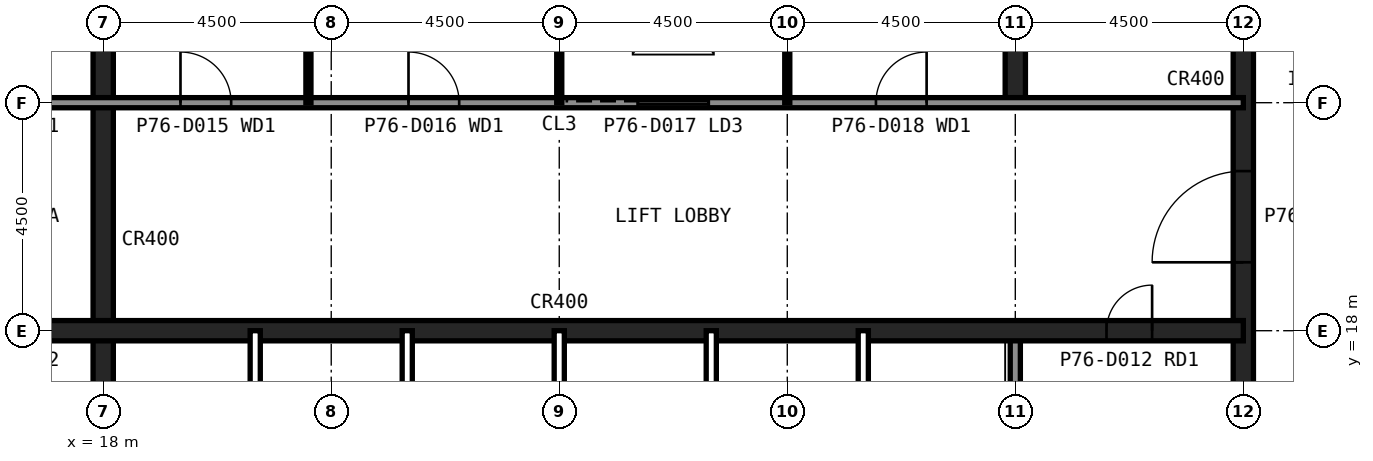
"""IFC4 building model, lengths in metres.
Left out: names, types, materials, properties, quantities, classifications, styles, units other than length and angle.
Written with IfcOpenShell. Run it as: python <this file> out.ifc"""

import sys

from ifc_helpers import new_model, si_unit, direction, frame, frame_2d, origin, place, context, subcontext, project, spatial, polyline, rectangle, outline, extrude, element, fill, save


model = new_model("IFC4")
c1 = context("Model", 3, precision=1e-05, world=origin(), true_north=direction((0.0, 1.0)))
c2 = subcontext(c1, "Body", "Model", "MODEL_VIEW")
j1 = project(units=[si_unit("LENGTHUNIT", "METRE"), si_unit("PLANEANGLEUNIT", "RADIAN")], contexts=[c1])
p1 = place(None, origin())
s1 = spatial("IfcSite", under=j1, at=p1, CompositionType="ELEMENT")
p2 = place(p1, origin())
s2 = spatial("IfcBuilding", under=s1, at=p2, CompositionType="ELEMENT")
p3 = place(p2, frame((0.0, 0.0, 320.1)))
s3 = spatial("IfcBuildingStorey", under=s2, at=p3, CompositionType="ELEMENT", Elevation=320.1)
p4 = place(p3, frame((40.5, 13.5, 0.0), z_axis=(0.0, 0.0, 1.0), x_axis=(0.0, 1.0, 0.0)))
e1 = element("IfcWall", 1, at=p4, inside=s3, PredefinedType="SHEAR", context=c2, shape_type="SweptSolid", body=[
    extrude(outline(polyline([(0.0, 0.0), (27.0, 0.0), (27.0, 17.377), (0.0, 9.277), (0.0, 0.0)])), frame((0.0, 0.2, 0.0), z_axis=(0.0, -1.0, 0.0), x_axis=(1.0, 0.0, 0.0)), (0.0, 0.0, 1.0), 0.4),
])
p5 = place(p4, frame((5.85, 0.0, 0.0)))
e2 = element("IfcOpeningElement", 2, at=p5, cuts=e1, PredefinedType="OPENING", context=c2, shape_type="SweptSolid", body=[
    extrude(rectangle(XDim=1.8, YDim=2.1, at=frame_2d((0.9, 1.05))), frame((0.0, 0.21, 0.0), z_axis=(0.0, -1.0, 0.0), x_axis=(1.0, 0.0, 0.0)), (0.0, 0.0, 1.0), 0.42),
])
p6 = place(p4, frame((19.65, 0.0, 0.0)))
e3 = element("IfcOpeningElement", 3, at=p6, cuts=e1, PredefinedType="OPENING", context=c2, shape_type="SweptSolid", body=[
    extrude(rectangle(XDim=1.2, YDim=2.1, at=frame_2d((0.6, 1.05))), frame((0.0, 0.21, 0.0), z_axis=(0.0, -1.0, 0.0), x_axis=(1.0, 0.0, 0.0)), (0.0, 0.0, 1.0), 0.42),
])
p7 = place(p3, frame((18.0, 13.5, 0.0), z_axis=(0.0, 0.0, 1.0), x_axis=(0.0, 1.0, 0.0)))
e4 = element("IfcWall", 4, at=p7, inside=s3, PredefinedType="SHEAR", context=c2, shape_type="SweptSolid", body=[
    extrude(outline(polyline([(0.0, 0.0), (18.0, 0.0), (18.0, 14.677), (0.0, 9.277), (0.0, 0.0)])), frame((0.0, 0.2, 0.0), z_axis=(0.0, -1.0, 0.0), x_axis=(1.0, 0.0, 0.0)), (0.0, 0.0, 1.0), 0.4),
])
p8 = place(p3, frame((36.0, 13.5, 0.0), z_axis=(0.0, 0.0, 1.0), x_axis=(0.0, 1.0, 0.0)))
e5 = element("IfcWall", 5, at=p8, inside=s3, PredefinedType="SOLIDWALL", context=c2, shape_type="SweptSolid", body=[
    extrude(outline(polyline([(0.0, 0.0), (4.5, 0.0), (4.5, 10.477), (0.0, 9.127), (0.0, 0.0)])), frame((0.0, 0.1, 0.0), z_axis=(0.0, -1.0, 0.0), x_axis=(1.0, 0.0, 0.0)), (0.0, 0.0, 1.0), 0.2),
])
p9 = place(p3, frame((36.0, 22.5, 0.0), z_axis=(0.0, 0.0, 1.0), x_axis=(0.0, 1.0, 0.0)))
e6 = element("IfcWall", 6, at=p9, inside=s3, PredefinedType="SHEAR", context=c2, shape_type="SweptSolid", body=[
    extrude(outline(polyline([(0.0, 0.0), (18.0, 0.0), (18.0, 17.377), (0.0, 11.977), (0.0, 0.0)])), frame((0.0, 0.2, 0.0), z_axis=(0.0, -1.0, 0.0), x_axis=(1.0, 0.0, 0.0)), (0.0, 0.0, 1.0), 0.4),
])
p10 = place(p3, frame((13.5, 18.0, 0.0), z_axis=(0.0, 0.0, 1.0), x_axis=(1.0, 0.0, 0.0)))
e7 = element("IfcWall", 7, at=p10, inside=s3, PredefinedType="SHEAR", context=c2, shape_type="SweptSolid", body=[
    extrude(rectangle(XDim=27.0, YDim=0.4, at=frame_2d((13.5, 0.0))), origin(), (0.0, 0.0, 1.0), 10.627),
])
p11 = place(p10, frame((24.3, 0.0, 0.0)))
e8 = element("IfcOpeningElement", 8, at=p11, cuts=e7, PredefinedType="OPENING", context=c2, shape_type="SweptSolid", body=[
    extrude(rectangle(XDim=0.9, YDim=2.1, at=frame_2d((0.45, 1.05))), frame((0.0, 0.21, 0.0), z_axis=(0.0, -1.0, 0.0), x_axis=(1.0, 0.0, 0.0)), (0.0, 0.0, 1.0), 0.42),
])
p12 = place(p10, frame((1.6, 0.0, 0.0)))
e9 = element("IfcOpeningElement", 9, at=p12, cuts=e7, PredefinedType="OPENING", context=c2, shape_type="SweptSolid", body=[
    extrude(rectangle(XDim=1.3, YDim=2.2, at=frame_2d((0.65, 1.1))), frame((0.0, 0.21, 0.0), z_axis=(0.0, -1.0, 0.0), x_axis=(1.0, 0.0, 0.0)), (0.0, 0.0, 1.0), 0.42),
])
p13 = place(p3, frame((13.5, 22.5, 0.0), z_axis=(0.0, 0.0, 1.0), x_axis=(1.0, 0.0, 0.0)))
e10 = element("IfcWall", 10, at=p13, inside=s3, PredefinedType="SOLIDWALL", context=c2, shape_type="SweptSolid", body=[
    extrude(rectangle(XDim=27.0, YDim=0.2, at=frame_2d((13.5, 0.0))), origin(), (0.0, 0.0, 1.0), 11.827),
])
p14 = place(p13, frame((1.65, 0.0, 0.0)))
e11 = element("IfcOpeningElement", 11, at=p14, cuts=e10, PredefinedType="OPENING", context=c2, shape_type="SweptSolid", body=[
    extrude(rectangle(XDim=1.2, YDim=2.1, at=frame_2d((0.6, 1.05))), frame((0.0, 0.11, 0.0), z_axis=(0.0, -1.0, 0.0), x_axis=(1.0, 0.0, 0.0)), (0.0, 0.0, 1.0), 0.22),
])
p15 = place(p13, frame((6.025, 0.0, 0.0)))
e12 = element("IfcOpeningElement", 12, at=p15, cuts=e10, PredefinedType="OPENING", context=c2, shape_type="SweptSolid", body=[
    extrude(rectangle(XDim=1.0, YDim=2.1, at=frame_2d((0.5, 1.05))), frame((0.0, 0.11, 0.0), z_axis=(0.0, -1.0, 0.0), x_axis=(1.0, 0.0, 0.0)), (0.0, 0.0, 1.0), 0.22),
])
p16 = place(p13, frame((10.525, 0.0, 0.0)))
e13 = element("IfcOpeningElement", 13, at=p16, cuts=e10, PredefinedType="OPENING", context=c2, shape_type="SweptSolid", body=[
    extrude(rectangle(XDim=1.0, YDim=2.1, at=frame_2d((0.5, 1.05))), frame((0.0, 0.11, 0.0), z_axis=(0.0, -1.0, 0.0), x_axis=(1.0, 0.0, 0.0)), (0.0, 0.0, 1.0), 0.22),
])
p17 = place(p13, frame((19.75, 0.0, 0.0)))
e14 = element("IfcOpeningElement", 14, at=p17, cuts=e10, PredefinedType="OPENING", context=c2, shape_type="SweptSolid", body=[
    extrude(rectangle(XDim=1.0, YDim=2.1, at=frame_2d((0.5, 1.05))), frame((0.0, 0.11, 0.0), z_axis=(0.0, -1.0, 0.0), x_axis=(1.0, 0.0, 0.0)), (0.0, 0.0, 1.0), 0.22),
])
p18 = place(p13, frame((15.05, 0.0, 0.0)))
e15 = element("IfcOpeningElement", 15, at=p18, cuts=e10, PredefinedType="OPENING", context=c2, shape_type="SweptSolid", body=[
    extrude(rectangle(XDim=1.4, YDim=2.4, at=frame_2d((0.7, 1.2))), frame((0.0, 0.11, 0.0), z_axis=(0.0, -1.0, 0.0), x_axis=(1.0, 0.0, 0.0)), (0.0, 0.0, 1.0), 0.22),
])
p19 = place(p3, frame((17.739, -0.63, 0.0), z_axis=(0.0, 0.0, 1.0), x_axis=(-0.707106781187, 0.707106781187, 0.0)))
e16 = element("IfcWall", 16, at=p19, inside=s3, PredefinedType="SOLIDWALL", context=c2, shape_type="SweptSolid", body=[
    extrude(outline(polyline([(0.0, 0.0), (25.978, 0.0), (25.978, 12.722), (0.0, 7.211), (0.0, 0.0)])), frame((0.0, 0.15, 0.0), z_axis=(0.0, -1.0, 0.0), x_axis=(1.0, 0.0, 0.0)), (0.0, 0.0, 1.0), 0.3),
])
p20 = place(p19, frame((0.424, 0.0, 1.2)))
e17 = element("IfcOpeningElement", 17, at=p20, cuts=e16, PredefinedType="OPENING", context=c2, shape_type="SweptSolid", body=[
    extrude(rectangle(XDim=2.4, YDim=2.4, at=frame_2d((1.2, 1.2))), frame((0.0, 0.16, 0.0), z_axis=(0.0, -1.0, 0.0), x_axis=(1.0, 0.0, 0.0)), (0.0, 0.0, 1.0), 0.32),
])
p21 = place(p19, frame((3.671, 0.0, 1.2)))
e18 = element("IfcOpeningElement", 18, at=p21, cuts=e16, PredefinedType="OPENING", context=c2, shape_type="SweptSolid", body=[
    extrude(rectangle(XDim=2.4, YDim=2.4, at=frame_2d((1.2, 1.2))), frame((0.0, 0.16, 0.0), z_axis=(0.0, -1.0, 0.0), x_axis=(1.0, 0.0, 0.0)), (0.0, 0.0, 1.0), 0.32),
])
p22 = place(p19, frame((6.918, 0.0, 1.2)))
e19 = element("IfcOpeningElement", 19, at=p22, cuts=e16, PredefinedType="OPENING", context=c2, shape_type="SweptSolid", body=[
    extrude(rectangle(XDim=2.4, YDim=2.4, at=frame_2d((1.2, 1.2))), frame((0.0, 0.16, 0.0), z_axis=(0.0, -1.0, 0.0), x_axis=(1.0, 0.0, 0.0)), (0.0, 0.0, 1.0), 0.32),
])
p23 = place(p19, frame((10.165, 0.0, 1.2)))
e20 = element("IfcOpeningElement", 20, at=p23, cuts=e16, PredefinedType="OPENING", context=c2, shape_type="SweptSolid", body=[
    extrude(rectangle(XDim=2.4, YDim=2.4, at=frame_2d((1.2, 1.2))), frame((0.0, 0.16, 0.0), z_axis=(0.0, -1.0, 0.0), x_axis=(1.0, 0.0, 0.0)), (0.0, 0.0, 1.0), 0.32),
])
p24 = place(p19, frame((13.412, 0.0, 5.25)))
e21 = element("IfcOpeningElement", 21, at=p24, cuts=e16, PredefinedType="OPENING", context=c2, shape_type="SweptSolid", body=[
    extrude(rectangle(XDim=2.4, YDim=2.4, at=frame_2d((1.2, 1.2))), frame((0.0, 0.16, 0.0), z_axis=(0.0, -1.0, 0.0), x_axis=(1.0, 0.0, 0.0)), (0.0, 0.0, 1.0), 0.32),
])
p25 = place(p19, frame((16.66, 0.0, 5.35)))
e22 = element("IfcOpeningElement", 22, at=p25, cuts=e16, PredefinedType="OPENING", context=c2, shape_type="SweptSolid", body=[
    extrude(rectangle(XDim=2.4, YDim=2.4, at=frame_2d((1.2, 1.2))), frame((0.0, 0.16, 0.0), z_axis=(0.0, -1.0, 0.0), x_axis=(1.0, 0.0, 0.0)), (0.0, 0.0, 1.0), 0.32),
])
p26 = place(p19, frame((19.907, 0.0, 1.2)))
e23 = element("IfcOpeningElement", 23, at=p26, cuts=e16, PredefinedType="OPENING", context=c2, shape_type="SweptSolid", body=[
    extrude(rectangle(XDim=2.4, YDim=2.4, at=frame_2d((1.2, 1.2))), frame((0.0, 0.16, 0.0), z_axis=(0.0, -1.0, 0.0), x_axis=(1.0, 0.0, 0.0)), (0.0, 0.0, 1.0), 0.32),
])
p27 = place(p19, frame((23.154, 0.0, 1.2)))
e24 = element("IfcOpeningElement", 24, at=p27, cuts=e16, PredefinedType="OPENING", context=c2, shape_type="SweptSolid", body=[
    extrude(rectangle(XDim=2.4, YDim=2.4, at=frame_2d((1.2, 1.2))), frame((0.0, 0.16, 0.0), z_axis=(0.0, -1.0, 0.0), x_axis=(1.0, 0.0, 0.0)), (0.0, 0.0, 1.0), 0.32),
])
p28 = place(p3, frame((54.63, 17.739, 0.0), z_axis=(0.0, 0.0, 1.0), x_axis=(-0.707106781187, -0.707106781187, 0.0)))
e25 = element("IfcWall", 25, at=p28, inside=s3, PredefinedType="SOLIDWALL", context=c2, shape_type="SweptSolid", body=[
    extrude(outline(polyline([(0.0, 0.0), (25.978, 0.0), (25.978, 7.211), (0.0, 12.722), (0.0, 0.0)])), frame((0.0, 0.15, 0.0), z_axis=(0.0, -1.0, 0.0), x_axis=(1.0, 0.0, 0.0)), (0.0, 0.0, 1.0), 0.3),
])
p29 = place(p28, frame((0.424, 0.0, 1.2)))
e26 = element("IfcOpeningElement", 26, at=p29, cuts=e25, PredefinedType="OPENING", context=c2, shape_type="SweptSolid", body=[
    extrude(rectangle(XDim=2.4, YDim=2.4, at=frame_2d((1.2, 1.2))), frame((0.0, 0.16, 0.0), z_axis=(0.0, -1.0, 0.0), x_axis=(1.0, 0.0, 0.0)), (0.0, 0.0, 1.0), 0.32),
])
p30 = place(p28, frame((3.671, 0.0, 1.2)))
e27 = element("IfcOpeningElement", 27, at=p30, cuts=e25, PredefinedType="OPENING", context=c2, shape_type="SweptSolid", body=[
    extrude(rectangle(XDim=2.4, YDim=2.4, at=frame_2d((1.2, 1.2))), frame((0.0, 0.16, 0.0), z_axis=(0.0, -1.0, 0.0), x_axis=(1.0, 0.0, 0.0)), (0.0, 0.0, 1.0), 0.32),
])
p31 = place(p28, frame((6.918, 0.0, 5.35)))
e28 = element("IfcOpeningElement", 28, at=p31, cuts=e25, PredefinedType="OPENING", context=c2, shape_type="SweptSolid", body=[
    extrude(rectangle(XDim=2.4, YDim=2.4, at=frame_2d((1.2, 1.2))), frame((0.0, 0.16, 0.0), z_axis=(0.0, -1.0, 0.0), x_axis=(1.0, 0.0, 0.0)), (0.0, 0.0, 1.0), 0.32),
])
p32 = place(p28, frame((10.165, 0.0, 5.25)))
e29 = element("IfcOpeningElement", 29, at=p32, cuts=e25, PredefinedType="OPENING", context=c2, shape_type="SweptSolid", body=[
    extrude(rectangle(XDim=2.4, YDim=2.4, at=frame_2d((1.2, 1.2))), frame((0.0, 0.16, 0.0), z_axis=(0.0, -1.0, 0.0), x_axis=(1.0, 0.0, 0.0)), (0.0, 0.0, 1.0), 0.32),
])
p33 = place(p28, frame((13.412, 0.0, 1.2)))
e30 = element("IfcOpeningElement", 30, at=p33, cuts=e25, PredefinedType="OPENING", context=c2, shape_type="SweptSolid", body=[
    extrude(rectangle(XDim=2.4, YDim=2.4, at=frame_2d((1.2, 1.2))), frame((0.0, 0.16, 0.0), z_axis=(0.0, -1.0, 0.0), x_axis=(1.0, 0.0, 0.0)), (0.0, 0.0, 1.0), 0.32),
])
p34 = place(p28, frame((16.66, 0.0, 1.2)))
e31 = element("IfcOpeningElement", 31, at=p34, cuts=e25, PredefinedType="OPENING", context=c2, shape_type="SweptSolid", body=[
    extrude(rectangle(XDim=2.4, YDim=2.4, at=frame_2d((1.2, 1.2))), frame((0.0, 0.16, 0.0), z_axis=(0.0, -1.0, 0.0), x_axis=(1.0, 0.0, 0.0)), (0.0, 0.0, 1.0), 0.32),
])
p35 = place(p28, frame((19.907, 0.0, 1.2)))
e32 = element("IfcOpeningElement", 32, at=p35, cuts=e25, PredefinedType="OPENING", context=c2, shape_type="SweptSolid", body=[
    extrude(rectangle(XDim=2.4, YDim=2.4, at=frame_2d((1.2, 1.2))), frame((0.0, 0.16, 0.0), z_axis=(0.0, -1.0, 0.0), x_axis=(1.0, 0.0, 0.0)), (0.0, 0.0, 1.0), 0.32),
])
p36 = place(p28, frame((23.154, 0.0, 1.2)))
e33 = element("IfcOpeningElement", 33, at=p36, cuts=e25, PredefinedType="OPENING", context=c2, shape_type="SweptSolid", body=[
    extrude(rectangle(XDim=2.4, YDim=2.4, at=frame_2d((1.2, 1.2))), frame((0.0, 0.16, 0.0), z_axis=(0.0, -1.0, 0.0), x_axis=(1.0, 0.0, 0.0)), (0.0, 0.0, 1.0), 0.32),
])
for number, where, z_axis, x_axis in (
    (34, (21.0, 13.5, 0.0), (0.0, 0.0, 1.0), (0.0, 1.0, 0.0)),
    (35, (24.0, 13.5, 0.0), (0.0, 0.0, 1.0), (0.0, 1.0, 0.0)),
    (36, (27.0, 13.5, 0.0), (0.0, 0.0, 1.0), (0.0, 1.0, 0.0)),
    (37, (30.0, 13.5, 0.0), (0.0, 0.0, 1.0), (0.0, 1.0, 0.0)),
    (38, (33.0, 13.5, 0.0), (0.0, 0.0, 1.0), (0.0, 1.0, 0.0)),
):
    element("IfcWall", number, at=place(p3, frame(where, z_axis=z_axis, x_axis=x_axis)), inside=s3, PredefinedType="PARTITIONING", context=c2, shape_type="SweptSolid", body=[
        extrude(rectangle(XDim=4.5, YDim=0.2, at=frame_2d((2.25, 0.0))), origin(), (0.0, 0.0, 1.0), 4.2),
    ])
for number, where, z_axis, x_axis in (
    (39, (22.05, 22.5, 0.0), (0.0, 0.0, 1.0), (0.0, 1.0, 0.0)),
    (40, (27.0, 22.5, 0.0), (0.0, 0.0, 1.0), (0.0, 1.0, 0.0)),
    (41, (31.5, 22.5, 0.0), (0.0, 0.0, 1.0), (0.0, 1.0, 0.0)),
):
    element("IfcWall", number, at=place(p3, frame(where, z_axis=z_axis, x_axis=x_axis)), inside=s3, PredefinedType="PLUMBINGWALL", context=c2, shape_type="SweptSolid", body=[
        extrude(rectangle(XDim=9.0, YDim=0.1, at=frame_2d((4.5, 0.0))), origin(), (0.0, 0.0, 1.0), 4.246),
    ])
p37 = place(p5, origin())
e42 = element("IfcDoor", 42, at=p37, inside=s3, OperationType="SINGLE_SWING_LEFT", PredefinedType="DOOR", context=c2, shape_type="SweptSolid", body=[
    extrude(rectangle(XDim=1.8, YDim=2.1, at=frame_2d((0.9, 1.05))), frame((0.0, 0.025, 0.0), z_axis=(0.0, -1.0, 0.0), x_axis=(1.0, 0.0, 0.0)), (0.0, 0.0, 1.0), 0.05),
])
fill(e2, e42)
p38 = place(p15, origin())
e43 = element("IfcDoor", 43, at=p38, inside=s3, OperationType="SINGLE_SWING_LEFT", PredefinedType="DOOR", context=c2, shape_type="SweptSolid", body=[
    extrude(rectangle(XDim=1.0, YDim=2.1, at=frame_2d((0.5, 1.05))), frame((0.0, 0.025, 0.0), z_axis=(0.0, -1.0, 0.0), x_axis=(1.0, 0.0, 0.0)), (0.0, 0.0, 1.0), 0.05),
])
fill(e12, e43)
p39 = place(p16, origin())
e44 = element("IfcDoor", 44, at=p39, inside=s3, OperationType="SINGLE_SWING_LEFT", PredefinedType="DOOR", context=c2, shape_type="SweptSolid", body=[
    extrude(rectangle(XDim=1.0, YDim=2.1, at=frame_2d((0.5, 1.05))), frame((0.0, 0.025, 0.0), z_axis=(0.0, -1.0, 0.0), x_axis=(1.0, 0.0, 0.0)), (0.0, 0.0, 1.0), 0.05),
])
fill(e13, e44)
p40 = place(p17, origin())
e45 = element("IfcDoor", 45, at=p40, inside=s3, OperationType="SINGLE_SWING_RIGHT", PredefinedType="DOOR", context=c2, shape_type="SweptSolid", body=[
    extrude(rectangle(XDim=1.0, YDim=2.1, at=frame_2d((0.5, 1.05))), frame((0.0, 0.025, 0.0), z_axis=(0.0, -1.0, 0.0), x_axis=(1.0, 0.0, 0.0)), (0.0, 0.0, 1.0), 0.05),
])
fill(e14, e45)
p41 = place(p11, origin())
e46 = element("IfcDoor", 46, at=p41, inside=s3, OperationType="SINGLE_SWING_RIGHT", PredefinedType="DOOR", context=c2, shape_type="SweptSolid", body=[
    extrude(rectangle(XDim=0.9, YDim=2.1, at=frame_2d((0.45, 1.05))), frame((0.0, 0.025, 0.0), z_axis=(0.0, -1.0, 0.0), x_axis=(1.0, 0.0, 0.0)), (0.0, 0.0, 1.0), 0.05),
])
fill(e8, e46)
p42 = place(p18, origin())
e47 = element("IfcDoor", 47, at=p42, inside=s3, OperationType="SLIDING_TO_LEFT", PredefinedType="DOOR", context=c2, shape_type="SweptSolid", body=[
    extrude(rectangle(XDim=1.4, YDim=2.4, at=frame_2d((0.7, 1.2))), frame((0.0, 0.025, 0.0), z_axis=(0.0, -1.0, 0.0), x_axis=(1.0, 0.0, 0.0)), (0.0, 0.0, 1.0), 0.05),
])
fill(e15, e47)
save(model, sys.argv[1])
